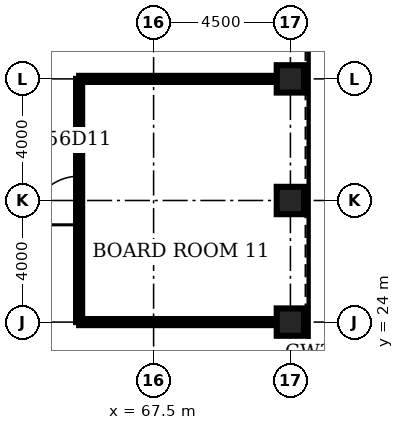
"""IFC4 building model, lengths in metres.
Left out: names, types, materials, properties, quantities, classifications, styles, units other than length and angle.
Written with IfcOpenShell. Run it as: python <this file> out.ifc"""

import sys

from ifc_helpers import new_model, si_unit, direction, frame, frame_2d, origin, origin_2d, place, context, subcontext, project, spatial, rectangle, hollow_rectangle, extrude, element, fill, save


model = new_model("IFC4")
c1 = context("Model", 3, precision=1e-05, world=origin(), true_north=direction((0.0, 1.0)))
c2 = subcontext(c1, "Body", "Model", "MODEL_VIEW")
j1 = project(units=[si_unit("LENGTHUNIT", "METRE"), si_unit("PLANEANGLEUNIT", "RADIAN")], contexts=[c1])
p1 = place(None, origin())
s1 = spatial("IfcSite", under=j1, at=p1, CompositionType="ELEMENT")
p2 = place(p1, origin())
s2 = spatial("IfcBuilding", under=s1, at=p2, CompositionType="ELEMENT")
p3 = place(p2, frame((0.0, 0.0, 248.8)))
s3 = spatial("IfcBuildingStorey", under=s2, at=p3, CompositionType="ELEMENT", Elevation=248.8)
for number, where, z_axis, x_axis in (
    (1, (72.0, 24.0, 0.0), (0.0, 0.0, 1.0), (1.0, 0.0, 0.0)),
    (2, (72.0, 28.0, 0.0), (0.0, 0.0, 1.0), (1.0, 0.0, 0.0)),
    (3, (72.0, 32.0, 0.0), (0.0, 0.0, 1.0), (1.0, 0.0, 0.0)),
):
    element("IfcColumn", number, at=place(p3, frame(where, z_axis=z_axis, x_axis=x_axis)), inside=s3, PredefinedType="COLUMN", context=c2, shape_type="SweptSolid", body=[
        extrude(hollow_rectangle(XDim=0.9, YDim=0.9, WallThickness=0.07, at=origin_2d()), origin(), (0.0, 0.0, 1.0), 4.2),
    ])
for number, where, z_axis, x_axis in (
    (4, (65.05, 24.0, 0.0), (0.0, 0.0, 1.0), (1.0, 0.0, 0.0)),
    (5, (65.05, 32.0, 0.0), (0.0, 0.0, 1.0), (1.0, 0.0, 0.0)),
):
    element("IfcWall", number, at=place(p3, frame(where, z_axis=z_axis, x_axis=x_axis)), inside=s3, PredefinedType="PARTITIONING", context=c2, shape_type="SweptSolid", body=[
        extrude(rectangle(XDim=6.5, YDim=0.2, at=frame_2d((3.25, 0.0))), origin(), (0.0, 0.0, 1.0), 3.0),
    ])
p4 = place(p3, frame((65.05, 24.0, 0.0), z_axis=(0.0, 0.0, 1.0), x_axis=(0.0, 1.0, 0.0)))
e6 = element("IfcWall", 6, at=p4, inside=s3, PredefinedType="PARTITIONING", context=c2, shape_type="SweptSolid", body=[
    extrude(rectangle(XDim=8.0, YDim=0.2, at=frame_2d((4.0, 0.0))), origin(), (0.0, 0.0, 1.0), 3.0),
])
p5 = place(p4, frame((3.2, 0.0, 0.0)))
e7 = element("IfcOpeningElement", 7, at=p5, cuts=e6, PredefinedType="OPENING", context=c2, shape_type="SweptSolid", body=[
    extrude(rectangle(XDim=1.6, YDim=2.1, at=frame_2d((0.8, 1.05))), frame((0.0, 0.11, 0.0), z_axis=(0.0, -1.0, 0.0), x_axis=(1.0, 0.0, 0.0)), (0.0, 0.0, 1.0), 0.22),
])
p6 = place(p5, origin())
e8 = element("IfcDoor", 8, at=p6, inside=s3, OperationType="SINGLE_SWING_LEFT", PredefinedType="DOOR", context=c2, shape_type="SweptSolid", body=[
    extrude(rectangle(XDim=1.6, YDim=2.1, at=frame_2d((0.8, 1.05))), frame((0.0, 0.025, 0.0), z_axis=(0.0, -1.0, 0.0), x_axis=(1.0, 0.0, 0.0)), (0.0, 0.0, 1.0), 0.05),
])
fill(e7, e8)
save(model, sys.argv[1])
